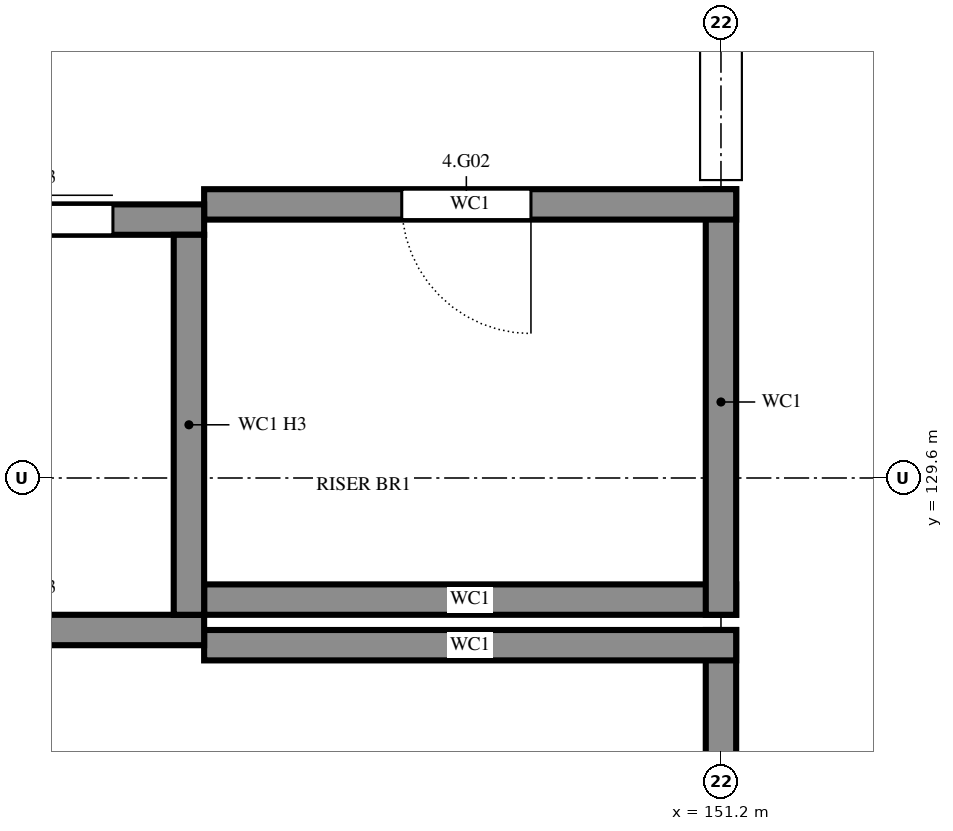
"""IFC4 building model, lengths in metres.
Left out: names, types, materials, properties, quantities, classifications, styles, units other than length and angle.
Written with IfcOpenShell. Run it as: python <this file> out.ifc"""

import sys

from ifc_helpers import new_model, si_unit, direction, frame, frame_2d, origin, place, context, subcontext, project, spatial, rectangle, extrude, element, fill, save


model = new_model("IFC4")
c1 = context("Model", 3, precision=1e-05, world=origin(), true_north=direction((0.0, 1.0)))
c2 = subcontext(c1, "Body", "Model", "MODEL_VIEW")
j1 = project(units=[si_unit("LENGTHUNIT", "METRE"), si_unit("PLANEANGLEUNIT", "RADIAN")], contexts=[c1])
p1 = place(None, origin())
s1 = spatial("IfcSite", under=j1, at=p1, CompositionType="ELEMENT")
p2 = place(p1, origin())
s2 = spatial("IfcBuilding", under=s1, at=p2, CompositionType="ELEMENT")
p3 = place(p2, frame((0.0, 0.0, 14.4)))
s3 = spatial("IfcBuildingStorey", under=s2, at=p3, CompositionType="ELEMENT", Elevation=14.4)
p4 = place(p3, frame((151.2, 125.3, 0.0), z_axis=(0.0, 0.0, 1.0), x_axis=(0.0, 1.0, 0.0)))
e1 = element("IfcWall", 1, at=p4, inside=s3, PredefinedType="SHEAR", context=c2, shape_type="SweptSolid", body=[
    extrude(rectangle(XDim=3.3, YDim=0.2, at=frame_2d((1.65, 0.0))), origin(), (0.0, 0.0, 1.0), 3.6),
])
for number, where, z_axis, x_axis in (
    (2, (147.8, 128.5, 0.0), (0.0, 0.0, 1.0), (1.0, 0.0, 0.0)),
    (3, (147.8, 128.8, 0.0), (0.0, 0.0, 1.0), (1.0, 0.0, 0.0)),
):
    element("IfcWall", number, at=place(p3, frame(where, z_axis=z_axis, x_axis=x_axis)), inside=s3, PredefinedType="SHEAR", context=c2, shape_type="SweptSolid", body=[
        extrude(rectangle(XDim=3.5, YDim=0.2, at=frame_2d((1.75, 0.0))), origin(), (0.0, 0.0, 1.0), 3.6),
    ])
p5 = place(p3, frame((151.2, 128.7, 0.0), z_axis=(0.0, 0.0, 1.0), x_axis=(0.0, 1.0, 0.0)))
e4 = element("IfcWall", 4, at=p5, inside=s3, PredefinedType="SHEAR", context=c2, shape_type="SweptSolid", body=[
    extrude(rectangle(XDim=2.8, YDim=0.2, at=frame_2d((1.4, 0.0))), origin(), (0.0, 0.0, 1.0), 3.6),
])
p6 = place(p3, frame((151.3, 131.4, 0.0), z_axis=(0.0, 0.0, 1.0), x_axis=(-1.0, 0.0, 0.0)))
e5 = element("IfcWall", 5, at=p6, inside=s3, PredefinedType="SHEAR", context=c2, shape_type="SweptSolid", body=[
    extrude(rectangle(XDim=3.5, YDim=0.2, at=frame_2d((1.75, 0.0))), origin(), (0.0, 0.0, 1.0), 3.6),
])
p7 = place(p6, frame((1.35, 0.0, 0.0)))
e6 = element("IfcOpeningElement", 6, at=p7, cuts=e5, PredefinedType="OPENING", context=c2, shape_type="SweptSolid", body=[
    extrude(rectangle(XDim=0.85, YDim=2.1, at=frame_2d((0.425, 1.05))), frame((0.0, 0.11, 0.0), z_axis=(0.0, -1.0, 0.0), x_axis=(1.0, 0.0, 0.0)), (0.0, 0.0, 1.0), 0.22),
])
p8 = place(p3, frame((145.4, 128.6, 0.0), z_axis=(0.0, 0.0, 1.0), x_axis=(1.0, 0.0, 0.0)))
e7 = element("IfcWall", 7, at=p8, inside=s3, PredefinedType="SHEAR", context=c2, shape_type="SweptSolid", body=[
    extrude(rectangle(XDim=2.4, YDim=0.2, at=frame_2d((1.2, 0.0))), origin(), (0.0, 0.0, 1.0), 4.5),
])
p9 = place(p3, frame((145.4, 131.3, 0.0), z_axis=(0.0, 0.0, 1.0), x_axis=(1.0, 0.0, 0.0)))
e8 = element("IfcWall", 8, at=p9, inside=s3, PredefinedType="SHEAR", context=c2, shape_type="SweptSolid", body=[
    extrude(rectangle(XDim=2.4, YDim=0.2, at=frame_2d((1.2, 0.0))), origin(), (0.0, 0.0, 1.0), 4.5),
])
p10 = place(p9, frame((0.6, 0.0, 0.0)))
e9 = element("IfcOpeningElement", 9, at=p10, cuts=e8, PredefinedType="OPENING", context=c2, shape_type="SweptSolid", body=[
    extrude(rectangle(XDim=1.2, YDim=2.1, at=frame_2d((0.6, 1.05))), frame((0.0, 0.11, 0.0), z_axis=(0.0, -1.0, 0.0), x_axis=(1.0, 0.0, 0.0)), (0.0, 0.0, 1.0), 0.22),
])
p11 = place(p3, frame((147.7, 128.7, 0.0), z_axis=(0.0, 0.0, 1.0), x_axis=(0.0, 1.0, 0.0)))
e10 = element("IfcWall", 10, at=p11, inside=s3, PredefinedType="SHEAR", context=c2, shape_type="SweptSolid", body=[
    extrude(rectangle(XDim=2.5, YDim=0.2, at=frame_2d((1.25, 0.0))), origin(), (0.0, 0.0, 1.0), 4.5),
])
p12 = place(p3, frame((151.2, 134.333, 0.0), z_axis=(0.0, 0.0, 1.0), x_axis=(0.0, -1.0, 0.0)))
e11 = element("IfcWall", 11, at=p12, inside=s3, PredefinedType="PARTITIONING", context=c2, shape_type="SweptSolid", body=[
    extrude(rectangle(XDim=2.772, YDim=0.275, at=frame_2d((1.386, 0.0))), origin(), (0.0, 0.0, 1.0), 3.6),
])
p13 = place(p10, origin())
e12 = element("IfcDoor", 12, at=p13, inside=s3, OperationType="SLIDING_TO_LEFT", PredefinedType="DOOR", context=c2, shape_type="SweptSolid", body=[
    extrude(rectangle(XDim=1.2, YDim=2.1, at=frame_2d((0.6, 1.05))), frame((0.0, 0.025, 0.0), z_axis=(0.0, -1.0, 0.0), x_axis=(1.0, 0.0, 0.0)), (0.0, 0.0, 1.0), 0.05),
])
fill(e9, e12)
p14 = place(p7, origin())
e13 = element("IfcDoor", 13, at=p14, inside=s3, OperationType="SINGLE_SWING_RIGHT", PredefinedType="DOOR", context=c2, shape_type="SweptSolid", body=[
    extrude(rectangle(XDim=0.85, YDim=2.1, at=frame_2d((0.425, 1.05))), frame((0.0, 0.025, 0.0), z_axis=(0.0, -1.0, 0.0), x_axis=(1.0, 0.0, 0.0)), (0.0, 0.0, 1.0), 0.05),
])
fill(e6, e13)
save(model, sys.argv[1])
